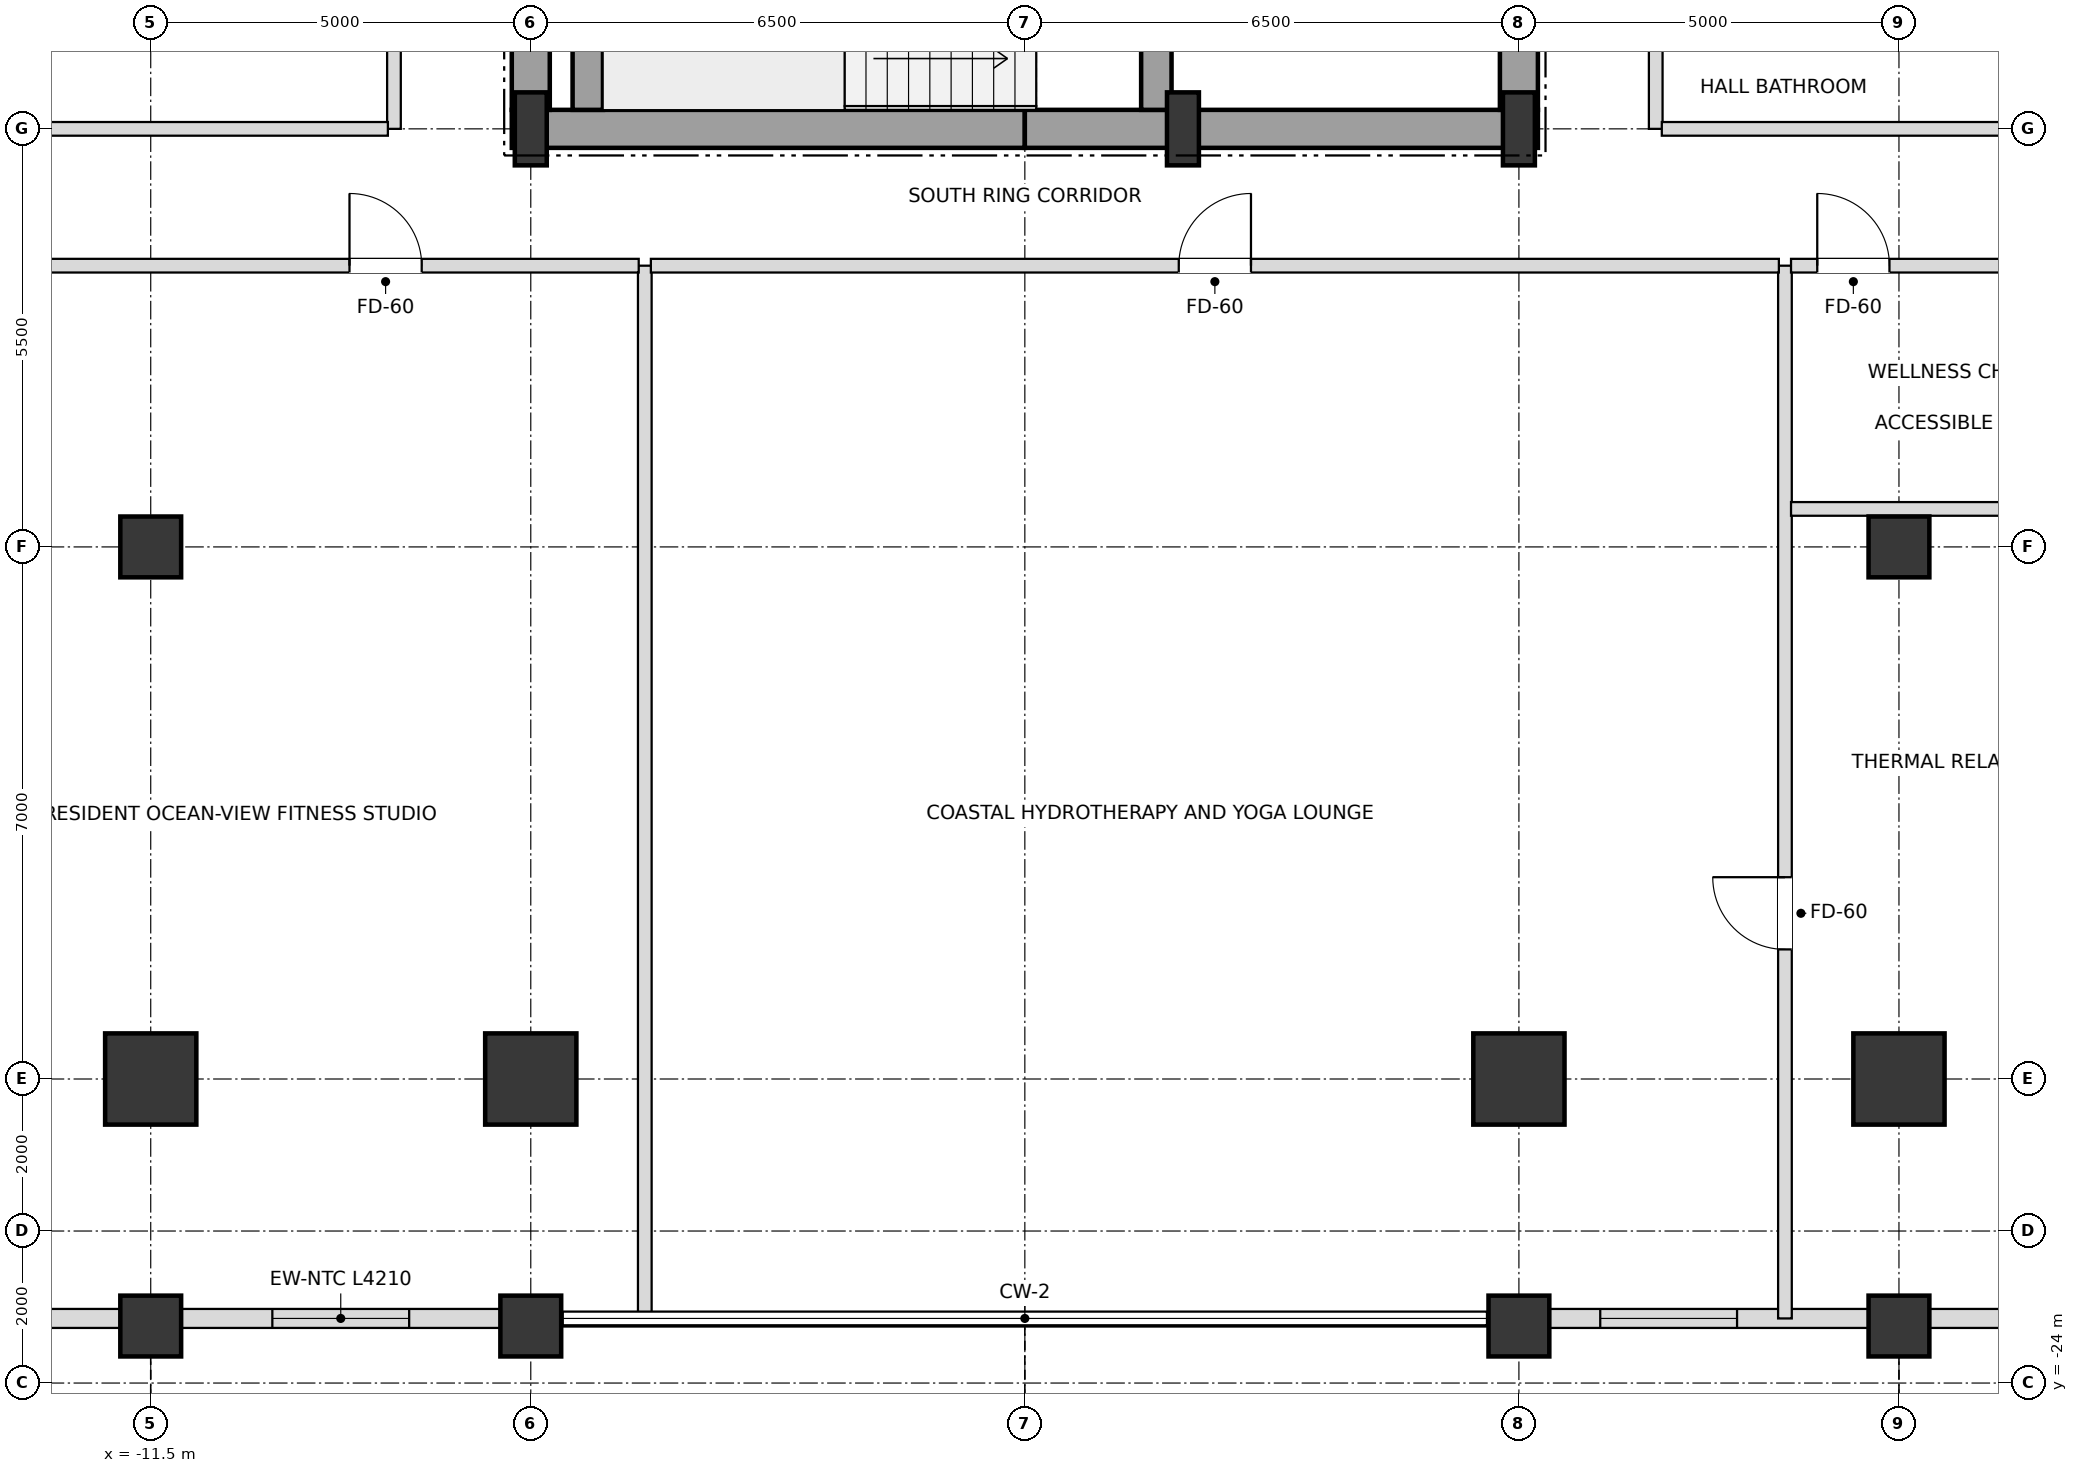
"""IFC4 building model, lengths in metres.
Left out: names, types, materials, properties, quantities, classifications, styles, units other than length and angle.
Written with IfcOpenShell. Run it as: python <this file> out.ifc"""

import sys

from ifc_helpers import new_model, si_unit, direction, frame, frame_2d, origin, origin_2d, place, context, subcontext, project, spatial, rectangle, i_section, extrude, element, fill, save


model = new_model("IFC4")
c1 = context("Model", 3, precision=1e-05, world=origin(), true_north=direction((0.0, 1.0)))
c2 = subcontext(c1, "Body", "Model", "MODEL_VIEW")
j1 = project(units=[si_unit("LENGTHUNIT", "METRE"), si_unit("PLANEANGLEUNIT", "RADIAN")], contexts=[c1])
p1 = place(None, origin())
s1 = spatial("IfcSite", under=j1, at=p1, CompositionType="ELEMENT")
p2 = place(p1, origin())
s2 = spatial("IfcBuilding", under=s1, at=p2, CompositionType="ELEMENT")
p3 = place(p2, frame((0.0, 0.0, 109.8)))
s3 = spatial("IfcBuildingStorey", under=s2, at=p3, CompositionType="ELEMENT", Elevation=109.8)
for number, where, z_axis, x_axis in (
    (1, (-6.5, -7.5, 0.0), (0.0, 0.0, 1.0), (1.0, 0.0, 0.0)),
    (2, (2.08, -7.5, 0.0), (0.0, 0.0, 1.0), (1.0, 0.0, 0.0)),
    (3, (6.5, -7.5, 0.0), (0.0, 0.0, 1.0), (1.0, 0.0, 0.0)),
):
    element("IfcColumn", number, at=place(p3, frame(where, z_axis=z_axis, x_axis=x_axis)), inside=s3, PredefinedType="COLUMN", context=c2, shape_type="SweptSolid", body=[
        extrude(i_section(OverallWidth=0.42, OverallDepth=0.96, WebThickness=0.022, FlangeThickness=0.034, at=origin_2d()), origin(), (0.0, 0.0, 1.0), 3.6),
    ])
for number, where, z_axis, x_axis in (
    (4, (-11.5, -20.0, 0.0), (0.0, 0.0, 1.0), (1.0, 0.0, 0.0)),
    (5, (-6.5, -20.0, 0.0), (0.0, 0.0, 1.0), (1.0, 0.0, 0.0)),
    (6, (6.5, -20.0, 0.0), (0.0, 0.0, 1.0), (1.0, 0.0, 0.0)),
    (7, (11.5, -20.0, 0.0), (0.0, 0.0, 1.0), (1.0, 0.0, 0.0)),
):
    element("IfcColumn", number, at=place(p3, frame(where, z_axis=z_axis, x_axis=x_axis)), inside=s3, PredefinedType="USERDEFINED", context=c2, shape_type="SweptSolid", body=[
        extrude(rectangle(XDim=1.2, YDim=1.2, at=origin_2d()), origin(), (0.0, 0.0, 1.0), 3.6),
    ])
for number, where, z_axis, x_axis in (
    (8, (-11.5, -13.0, 0.0), (0.0, 0.0, 1.0), (1.0, 0.0, 0.0)),
    (9, (11.5, -13.0, 0.0), (0.0, 0.0, 1.0), (1.0, 0.0, 0.0)),
    (10, (-11.5, -23.25, 0.0), (0.0, 0.0, 1.0), (1.0, 0.0, 0.0)),
    (11, (-6.5, -23.25, 0.0), (0.0, 0.0, 1.0), (1.0, 0.0, 0.0)),
    (12, (6.5, -23.25, 0.0), (0.0, 0.0, 1.0), (1.0, 0.0, 0.0)),
    (13, (11.5, -23.25, 0.0), (0.0, 0.0, 1.0), (1.0, 0.0, 0.0)),
):
    element("IfcColumn", number, at=place(p3, frame(where, z_axis=z_axis, x_axis=x_axis)), inside=s3, PredefinedType="COLUMN", context=c2, shape_type="SweptSolid", body=[
        extrude(rectangle(XDim=0.8, YDim=0.8, at=origin_2d()), origin(), (0.0, 0.0, 1.0), 3.6),
    ])
p4 = place(p3, frame((-15.675, -23.15, 0.0), z_axis=(0.0, 0.0, 1.0), x_axis=(1.0, 0.0, 0.0)))
e14 = element("IfcWall", 14, at=p4, inside=s3, PredefinedType="SOLIDWALL", context=c2, shape_type="SweptSolid", body=[
    extrude(rectangle(XDim=3.78, YDim=0.25, at=frame_2d((1.89, 0.0))), origin(), (0.0, 0.0, 1.0), 2.736),
])
p5 = place(p4, frame((0.968, 0.0, 0.72)))
e15 = element("IfcOpeningElement", 15, at=p5, cuts=e14, PredefinedType="OPENING", context=c2, shape_type="SweptSolid", body=[
    extrude(rectangle(XDim=1.8, YDim=1.68, at=frame_2d((0.9, 0.84))), frame((0.0, 0.135, 0.0), z_axis=(0.0, -1.0, 0.0), x_axis=(1.0, 0.0, 0.0)), (0.0, 0.0, 1.0), 0.27),
])
p6 = place(p3, frame((-11.105, -23.15, 0.0), z_axis=(0.0, 0.0, 1.0), x_axis=(1.0, 0.0, 0.0)))
e16 = element("IfcWall", 16, at=p6, inside=s3, PredefinedType="SOLIDWALL", context=c2, shape_type="SweptSolid", body=[
    extrude(rectangle(XDim=4.21, YDim=0.25, at=frame_2d((2.105, 0.0))), origin(), (0.0, 0.0, 1.0), 2.736),
])
p7 = place(p6, frame((1.205, 0.0, 0.72)))
e17 = element("IfcOpeningElement", 17, at=p7, cuts=e16, PredefinedType="OPENING", context=c2, shape_type="SweptSolid", body=[
    extrude(rectangle(XDim=1.8, YDim=1.68, at=frame_2d((0.9, 0.84))), frame((0.0, 0.135, 0.0), z_axis=(0.0, -1.0, 0.0), x_axis=(1.0, 0.0, 0.0)), (0.0, 0.0, 1.0), 0.27),
])
p8 = place(p3, frame((6.895, -23.15, 0.0), z_axis=(0.0, 0.0, 1.0), x_axis=(1.0, 0.0, 0.0)))
e18 = element("IfcWall", 18, at=p8, inside=s3, PredefinedType="SOLIDWALL", context=c2, shape_type="SweptSolid", body=[
    extrude(rectangle(XDim=4.21, YDim=0.25, at=frame_2d((2.105, 0.0))), origin(), (0.0, 0.0, 1.0), 2.736),
])
p9 = place(p8, frame((0.675, 0.0, 0.72)))
e19 = element("IfcOpeningElement", 19, at=p9, cuts=e18, PredefinedType="OPENING", context=c2, shape_type="SweptSolid", body=[
    extrude(rectangle(XDim=1.8, YDim=1.68, at=frame_2d((0.9, 0.84))), frame((0.0, 0.135, 0.0), z_axis=(0.0, -1.0, 0.0), x_axis=(1.0, 0.0, 0.0)), (0.0, 0.0, 1.0), 0.27),
])
p10 = place(p3, frame((11.895, -23.15, 0.0), z_axis=(0.0, 0.0, 1.0), x_axis=(1.0, 0.0, 0.0)))
e20 = element("IfcWall", 20, at=p10, inside=s3, PredefinedType="SOLIDWALL", context=c2, shape_type="SweptSolid", body=[
    extrude(rectangle(XDim=3.78, YDim=0.25, at=frame_2d((1.89, 0.0))), origin(), (0.0, 0.0, 1.0), 2.736),
])
p11 = place(p10, frame((1.013, 0.0, 0.72)))
e21 = element("IfcOpeningElement", 21, at=p11, cuts=e20, PredefinedType="OPENING", context=c2, shape_type="SweptSolid", body=[
    extrude(rectangle(XDim=1.8, YDim=1.68, at=frame_2d((0.9, 0.84))), frame((0.0, 0.135, 0.0), z_axis=(0.0, -1.0, 0.0), x_axis=(1.0, 0.0, 0.0)), (0.0, 0.0, 1.0), 0.27),
])
for number, where, z_axis, x_axis in (
    (22, (-6.75, -7.5, 0.0), (0.0, 0.0, 1.0), (1.0, 0.0, 0.0)),
    (23, (0.0, -7.5, 0.0), (0.0, 0.0, 1.0), (1.0, 0.0, 0.0)),
):
    element("IfcWall", number, at=place(p3, frame(where, z_axis=z_axis, x_axis=x_axis)), inside=s3, PredefinedType="SHEAR", context=c2, shape_type="SweptSolid", body=[
        extrude(rectangle(XDim=6.75, YDim=0.5, at=frame_2d((3.375, 0.0))), origin(), (0.0, 0.0, 1.0), 3.38),
    ])
p12 = place(p3, frame((-6.5, -7.25, 0.0), z_axis=(0.0, 0.0, 1.0), x_axis=(0.0, 1.0, 0.0)))
e24 = element("IfcWall", 24, at=p12, inside=s3, PredefinedType="SHEAR", context=c2, shape_type="SweptSolid", body=[
    extrude(rectangle(XDim=3.55, YDim=0.5, at=frame_2d((1.775, 0.0))), origin(), (0.0, 0.0, 1.0), 3.38),
])
p13 = place(p3, frame((6.5, -7.25, 0.0), z_axis=(0.0, 0.0, 1.0), x_axis=(0.0, 1.0, 0.0)))
e25 = element("IfcWall", 25, at=p13, inside=s3, PredefinedType="SHEAR", context=c2, shape_type="SweptSolid", body=[
    extrude(rectangle(XDim=5.75, YDim=0.5, at=frame_2d((2.875, 0.0))), origin(), (0.0, 0.0, 1.0), 3.38),
])
p14 = place(p13, frame((0.85, 0.0, 0.0)))
e26 = element("IfcOpeningElement", 26, at=p14, cuts=e25, PredefinedType="OPENING", context=c2, shape_type="SweptSolid", body=[
    extrude(rectangle(XDim=1.05, YDim=2.15, at=frame_2d((0.525, 1.075))), frame((0.0, 0.26, 0.0), z_axis=(0.0, -1.0, 0.0), x_axis=(1.0, 0.0, 0.0)), (0.0, 0.0, 1.0), 0.52),
])
p15 = place(p3, frame((-5.75, -7.25, 0.0), z_axis=(0.0, 0.0, 1.0), x_axis=(0.0, 1.0, 0.0)))
e27 = element("IfcWall", 27, at=p15, inside=s3, PredefinedType="SHEAR", context=c2, shape_type="SweptSolid", body=[
    extrude(rectangle(XDim=2.9, YDim=0.4, at=frame_2d((1.45, 0.0))), origin(), (0.0, 0.0, 1.0), 3.38),
])
p16 = place(p3, frame((1.73, -7.25, 0.0), z_axis=(0.0, 0.0, 1.0), x_axis=(0.0, 1.0, 0.0)))
e28 = element("IfcWall", 28, at=p16, inside=s3, PredefinedType="SHEAR", context=c2, shape_type="SweptSolid", body=[
    extrude(rectangle(XDim=3.3, YDim=0.4, at=frame_2d((1.65, 0.0))), origin(), (0.0, 0.0, 1.0), 3.38),
])
p17 = place(p16, frame((0.9, 0.0, 0.0)))
e29 = element("IfcOpeningElement", 29, at=p17, cuts=e28, PredefinedType="OPENING", context=c2, shape_type="SweptSolid", body=[
    extrude(rectangle(XDim=1.05, YDim=2.15, at=frame_2d((0.525, 1.075))), frame((0.0, 0.21, 0.0), z_axis=(0.0, -1.0, 0.0), x_axis=(1.0, 0.0, 0.0)), (0.0, 0.0, 1.0), 0.42),
])
p18 = place(p3, frame((-8.3, -7.5, 0.0), z_axis=(0.0, 0.0, 1.0), x_axis=(0.0, 1.0, 0.0)))
e30 = element("IfcWall", 30, at=p18, inside=s3, PredefinedType="PARTITIONING", context=c2, shape_type="SweptSolid", body=[
    extrude(rectangle(XDim=15.0, YDim=0.18, at=frame_2d((7.5, 0.0))), origin(), (0.0, 0.0, 1.0), 3.38),
])
p19 = place(p18, frame((2.075, 0.0, 0.0)))
e31 = element("IfcOpeningElement", 31, at=p19, cuts=e30, PredefinedType="OPENING", context=c2, shape_type="SweptSolid", body=[
    extrude(rectangle(XDim=0.95, YDim=2.15, at=frame_2d((0.475, 1.075))), frame((0.0, 0.1, 0.0), z_axis=(0.0, -1.0, 0.0), x_axis=(1.0, 0.0, 0.0)), (0.0, 0.0, 1.0), 0.2),
])
p20 = place(p18, frame((8.475, 0.0, 0.0)))
e32 = element("IfcOpeningElement", 32, at=p20, cuts=e30, PredefinedType="OPENING", context=c2, shape_type="SweptSolid", body=[
    extrude(rectangle(XDim=0.95, YDim=2.15, at=frame_2d((0.475, 1.075))), frame((0.0, 0.1, 0.0), z_axis=(0.0, -1.0, 0.0), x_axis=(1.0, 0.0, 0.0)), (0.0, 0.0, 1.0), 0.2),
])
p21 = place(p18, frame((13.425, 0.0, 0.0)))
e33 = element("IfcOpeningElement", 33, at=p21, cuts=e30, PredefinedType="OPENING", context=c2, shape_type="SweptSolid", body=[
    extrude(rectangle(XDim=0.95, YDim=2.15, at=frame_2d((0.475, 1.075))), frame((0.0, 0.1, 0.0), z_axis=(0.0, -1.0, 0.0), x_axis=(1.0, 0.0, 0.0)), (0.0, 0.0, 1.0), 0.2),
])
p22 = place(p3, frame((-5.0, -23.15, 0.0), z_axis=(0.0, 0.0, 1.0), x_axis=(0.0, 1.0, 0.0)))
e34 = element("IfcWall", 34, at=p22, inside=s3, PredefinedType="PARTITIONING", context=c2, shape_type="SweptSolid", body=[
    extrude(rectangle(XDim=13.85, YDim=0.18, at=frame_2d((6.925, 0.0))), origin(), (0.0, 0.0, 1.0), 2.816),
])
p23 = place(p3, frame((8.3, -7.5, 0.0), z_axis=(0.0, 0.0, 1.0), x_axis=(0.0, 1.0, 0.0)))
e35 = element("IfcWall", 35, at=p23, inside=s3, PredefinedType="PARTITIONING", context=c2, shape_type="SweptSolid", body=[
    extrude(rectangle(XDim=15.0, YDim=0.18, at=frame_2d((7.5, 0.0))), origin(), (0.0, 0.0, 1.0), 3.38),
])
p24 = place(p23, frame((3.475, 0.0, 0.0)))
e36 = element("IfcOpeningElement", 36, at=p24, cuts=e35, PredefinedType="OPENING", context=c2, shape_type="SweptSolid", body=[
    extrude(rectangle(XDim=0.95, YDim=2.15, at=frame_2d((0.475, 1.075))), frame((0.0, 0.1, 0.0), z_axis=(0.0, -1.0, 0.0), x_axis=(1.0, 0.0, 0.0)), (0.0, 0.0, 1.0), 0.2),
])
p25 = place(p3, frame((10.0, -23.15, 0.0), z_axis=(0.0, 0.0, 1.0), x_axis=(0.0, 1.0, 0.0)))
e37 = element("IfcWall", 37, at=p25, inside=s3, PredefinedType="PARTITIONING", context=c2, shape_type="SweptSolid", body=[
    extrude(rectangle(XDim=13.85, YDim=0.18, at=frame_2d((6.925, 0.0))), origin(), (0.0, 0.0, 1.0), 2.816),
])
p26 = place(p25, frame((4.855, 0.0, 0.0)))
e38 = element("IfcOpeningElement", 38, at=p26, cuts=e37, PredefinedType="OPENING", context=c2, shape_type="SweptSolid", body=[
    extrude(rectangle(XDim=0.95, YDim=2.15, at=frame_2d((0.475, 1.075))), frame((0.0, 0.1, 0.0), z_axis=(0.0, -1.0, 0.0), x_axis=(1.0, 0.0, 0.0)), (0.0, 0.0, 1.0), 0.2),
])
p27 = place(p3, frame((10.08, -12.5, 0.0), z_axis=(0.0, 0.0, 1.0), x_axis=(1.0, 0.0, 0.0)))
e39 = element("IfcWall", 39, at=p27, inside=s3, PredefinedType="PARTITIONING", context=c2, shape_type="SweptSolid", body=[
    extrude(rectangle(XDim=5.49, YDim=0.18, at=frame_2d((2.745, 0.0))), origin(), (0.0, 0.0, 1.0), 3.38),
])
p28 = place(p3, frame((-15.65, -9.3, 0.0), z_axis=(0.0, 0.0, 1.0), x_axis=(1.0, 0.0, 0.0)))
e40 = element("IfcWall", 40, at=p28, inside=s3, PredefinedType="PARTITIONING", context=c2, shape_type="SweptSolid", body=[
    extrude(rectangle(XDim=10.57, YDim=0.18, at=frame_2d((5.285, 0.0))), origin(), (0.0, 0.0, 1.0), 2.816),
])
p29 = place(p28, frame((6.765, 0.0, 0.0)))
e41 = element("IfcOpeningElement", 41, at=p29, cuts=e40, PredefinedType="OPENING", context=c2, shape_type="SweptSolid", body=[
    extrude(rectangle(XDim=0.95, YDim=2.15, at=frame_2d((0.475, 1.075))), frame((0.0, 0.1, 0.0), z_axis=(0.0, -1.0, 0.0), x_axis=(1.0, 0.0, 0.0)), (0.0, 0.0, 1.0), 0.2),
])
p30 = place(p3, frame((-4.92, -9.3, 0.0), z_axis=(0.0, 0.0, 1.0), x_axis=(1.0, 0.0, 0.0)))
e42 = element("IfcWall", 42, at=p30, inside=s3, PredefinedType="PARTITIONING", context=c2, shape_type="SweptSolid", body=[
    extrude(rectangle(XDim=14.84, YDim=0.18, at=frame_2d((7.42, 0.0))), origin(), (0.0, 0.0, 1.0), 2.816),
])
p31 = place(p30, frame((6.945, 0.0, 0.0)))
e43 = element("IfcOpeningElement", 43, at=p31, cuts=e42, PredefinedType="OPENING", context=c2, shape_type="SweptSolid", body=[
    extrude(rectangle(XDim=0.95, YDim=2.15, at=frame_2d((0.475, 1.075))), frame((0.0, 0.1, 0.0), z_axis=(0.0, -1.0, 0.0), x_axis=(1.0, 0.0, 0.0)), (0.0, 0.0, 1.0), 0.2),
])
p32 = place(p3, frame((10.08, -9.3, 0.0), z_axis=(0.0, 0.0, 1.0), x_axis=(1.0, 0.0, 0.0)))
e44 = element("IfcWall", 44, at=p32, inside=s3, PredefinedType="PARTITIONING", context=c2, shape_type="SweptSolid", body=[
    extrude(rectangle(XDim=5.49, YDim=0.18, at=frame_2d((2.745, 0.0))), origin(), (0.0, 0.0, 1.0), 3.38),
])
p33 = place(p32, frame((0.345, 0.0, 0.0)))
e45 = element("IfcOpeningElement", 45, at=p33, cuts=e44, PredefinedType="OPENING", context=c2, shape_type="SweptSolid", body=[
    extrude(rectangle(XDim=0.95, YDim=2.15, at=frame_2d((0.475, 1.075))), frame((0.0, 0.1, 0.0), z_axis=(0.0, -1.0, 0.0), x_axis=(1.0, 0.0, 0.0)), (0.0, 0.0, 1.0), 0.2),
])
p34 = place(p3, frame((-20.15, -7.5, 0.0), z_axis=(0.0, 0.0, 1.0), x_axis=(1.0, 0.0, 0.0)))
e46 = element("IfcWall", 46, at=p34, inside=s3, PredefinedType="PARTITIONING", context=c2, shape_type="SweptSolid", body=[
    extrude(rectangle(XDim=11.77, YDim=0.18, at=frame_2d((5.885, 0.0))), origin(), (0.0, 0.0, 1.0), 2.816),
])
p35 = place(p3, frame((8.38, -7.5, 0.0), z_axis=(0.0, 0.0, 1.0), x_axis=(1.0, 0.0, 0.0)))
e47 = element("IfcWall", 47, at=p35, inside=s3, PredefinedType="PARTITIONING", context=c2, shape_type="SweptSolid", body=[
    extrude(rectangle(XDim=5.89, YDim=0.18, at=frame_2d((2.945, 0.0))), origin(), (0.0, 0.0, 1.0), 2.816),
])
p36 = place(p7, origin())
e48 = element("IfcWindow", 48, at=p36, inside=s3, PartitioningType="SINGLE_PANEL", PredefinedType="WINDOW", context=c2, shape_type="SweptSolid", body=[
    extrude(rectangle(XDim=1.8, YDim=1.68, at=frame_2d((0.9, 0.84))), frame((0.0, 0.03, 0.0), z_axis=(0.0, -1.0, 0.0), x_axis=(1.0, 0.0, 0.0)), (0.0, 0.0, 1.0), 0.06),
])
fill(e17, e48)
p37 = place(p9, origin())
e49 = element("IfcWindow", 49, at=p37, inside=s3, PartitioningType="SINGLE_PANEL", PredefinedType="WINDOW", context=c2, shape_type="SweptSolid", body=[
    extrude(rectangle(XDim=1.8, YDim=1.68, at=frame_2d((0.9, 0.84))), frame((0.0, 0.03, 0.0), z_axis=(0.0, -1.0, 0.0), x_axis=(1.0, 0.0, 0.0)), (0.0, 0.0, 1.0), 0.06),
])
fill(e19, e49)
p38 = place(p33, origin())
e50 = element("IfcDoor", 50, at=p38, inside=s3, OperationType="SINGLE_SWING_LEFT", PredefinedType="DOOR", context=c2, shape_type="SweptSolid", body=[
    extrude(rectangle(XDim=0.95, YDim=2.15, at=frame_2d((0.475, 1.075))), frame((0.0, 0.025, 0.0), z_axis=(0.0, -1.0, 0.0), x_axis=(1.0, 0.0, 0.0)), (0.0, 0.0, 1.0), 0.05),
])
fill(e45, e50)
p39 = place(p26, origin())
e51 = element("IfcDoor", 51, at=p39, inside=s3, OperationType="SINGLE_SWING_RIGHT", PredefinedType="DOOR", context=c2, shape_type="SweptSolid", body=[
    extrude(rectangle(XDim=0.95, YDim=2.15, at=frame_2d((0.475, 1.075))), frame((0.0, 0.025, 0.0), z_axis=(0.0, -1.0, 0.0), x_axis=(1.0, 0.0, 0.0)), (0.0, 0.0, 1.0), 0.05),
])
fill(e38, e51)
p40 = place(p29, origin())
e52 = element("IfcDoor", 52, at=p40, inside=s3, OperationType="SINGLE_SWING_LEFT", PredefinedType="DOOR", context=c2, shape_type="SweptSolid", body=[
    extrude(rectangle(XDim=0.95, YDim=2.15, at=frame_2d((0.475, 1.075))), frame((0.0, 0.025, 0.0), z_axis=(0.0, -1.0, 0.0), x_axis=(1.0, 0.0, 0.0)), (0.0, 0.0, 1.0), 0.05),
])
fill(e41, e52)
p41 = place(p31, origin())
e53 = element("IfcDoor", 53, at=p41, inside=s3, OperationType="SINGLE_SWING_RIGHT", PredefinedType="DOOR", context=c2, shape_type="SweptSolid", body=[
    extrude(rectangle(XDim=0.95, YDim=2.15, at=frame_2d((0.475, 1.075))), frame((0.0, 0.025, 0.0), z_axis=(0.0, -1.0, 0.0), x_axis=(1.0, 0.0, 0.0)), (0.0, 0.0, 1.0), 0.05),
])
fill(e43, e53)
save(model, sys.argv[1])
